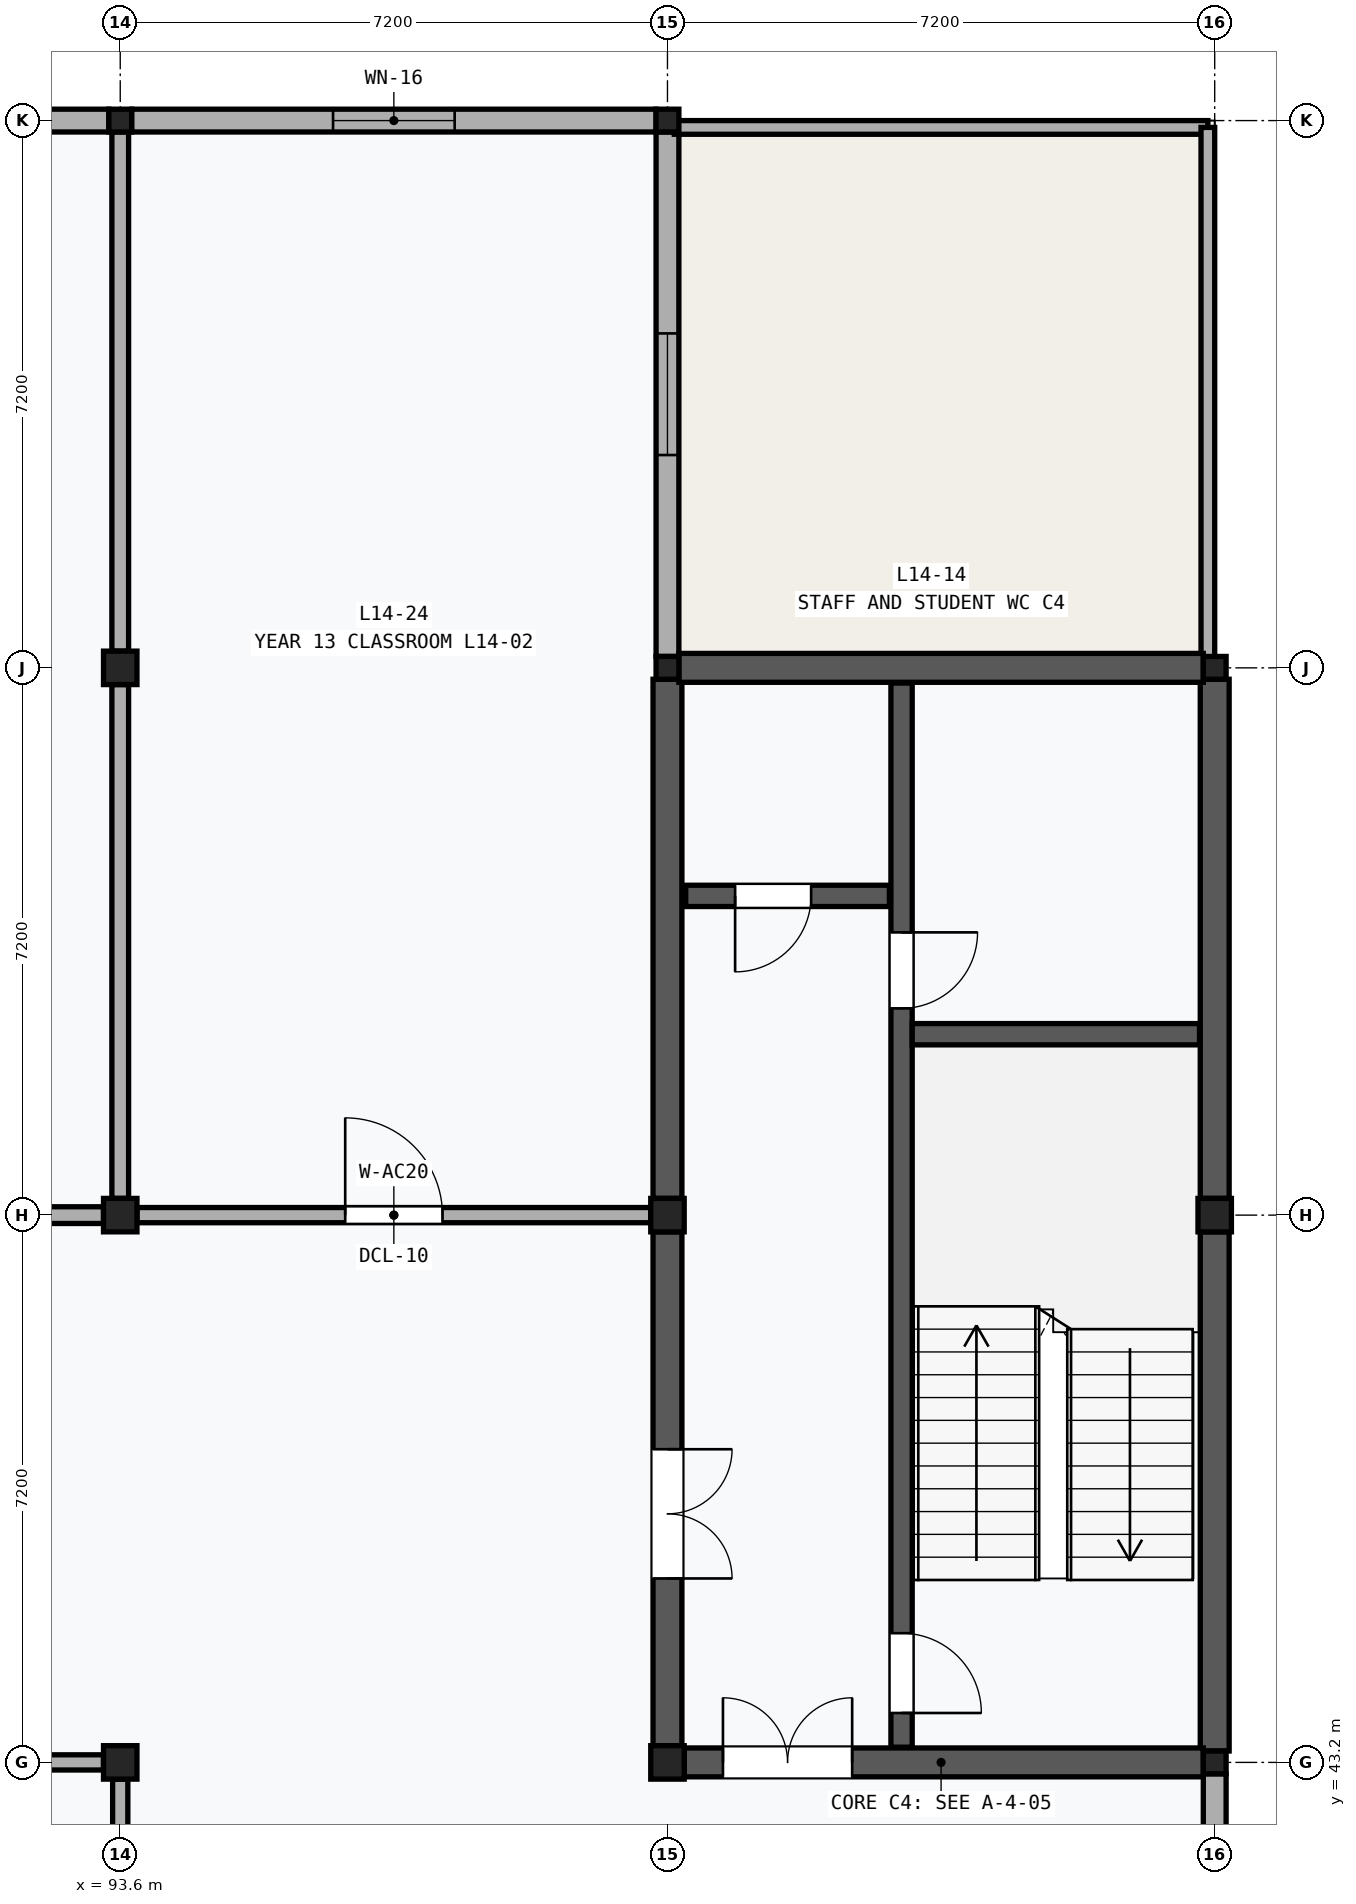
"""IFC4 building model, lengths in metres.
Left out: names, types, materials, properties, quantities, classifications, styles, units other than length and angle.
Written with IfcOpenShell. Run it as: python <this file> out.ifc"""

import sys

from ifc_helpers import new_model, si_unit, direction, frame, frame_2d, origin, origin_2d, place, context, subcontext, project, spatial, rectangle, extrude, element, fill, save


model = new_model("IFC4")
c1 = context("Model", 3, precision=1e-05, world=origin(), true_north=direction((0.0, 1.0)))
c2 = subcontext(c1, "Body", "Model", "MODEL_VIEW")
j1 = project(units=[si_unit("LENGTHUNIT", "METRE"), si_unit("PLANEANGLEUNIT", "RADIAN")], contexts=[c1])
p1 = place(None, origin())
s1 = spatial("IfcSite", under=j1, at=p1, CompositionType="ELEMENT")
p2 = place(p1, origin())
s2 = spatial("IfcBuilding", under=s1, at=p2, CompositionType="ELEMENT")
p3 = place(p2, frame((0.0, 0.0, 59.0)))
s3 = spatial("IfcBuildingStorey", under=s2, at=p3, CompositionType="ELEMENT", Elevation=59.0)
for number, where, z_axis, x_axis in (
    (1, (93.6, 43.2, 0.0), (0.0, 0.0, 1.0), (1.0, 0.0, 0.0)),
    (2, (93.6, 50.4, 0.0), (0.0, 0.0, 1.0), (1.0, 0.0, 0.0)),
    (3, (93.6, 57.6, 0.0), (0.0, 0.0, 1.0), (1.0, 0.0, 0.0)),
):
    element("IfcColumn", number, at=place(p3, frame(where, z_axis=z_axis, x_axis=x_axis)), inside=s3, PredefinedType="COLUMN", context=c2, shape_type="SweptSolid", body=[
        extrude(rectangle(XDim=0.44, YDim=0.44, at=origin_2d()), origin(), (0.0, 0.0, 1.0), 4.0),
    ])
p4 = place(p3, frame((93.6, 64.8, 0.0), z_axis=(0.0, 0.0, 1.0), x_axis=(1.0, 0.0, 0.0)))
e4 = element("IfcColumn", 4, at=p4, inside=s3, PredefinedType="COLUMN", context=c2, shape_type="SweptSolid", body=[
    extrude(rectangle(XDim=0.3, YDim=0.3, at=origin_2d()), origin(), (0.0, 0.0, 1.0), 4.0),
])
for number, where, z_axis, x_axis in (
    (5, (100.8, 43.2, 0.0), (0.0, 0.0, 1.0), (1.0, 0.0, 0.0)),
    (6, (100.8, 50.4, 0.0), (0.0, 0.0, 1.0), (1.0, 0.0, 0.0)),
):
    element("IfcColumn", number, at=place(p3, frame(where, z_axis=z_axis, x_axis=x_axis)), inside=s3, PredefinedType="COLUMN", context=c2, shape_type="SweptSolid", body=[
        extrude(rectangle(XDim=0.44, YDim=0.44, at=origin_2d()), origin(), (0.0, 0.0, 1.0), 4.0),
    ])
for number, where, z_axis, x_axis in (
    (7, (100.8, 57.6, 0.0), (0.0, 0.0, 1.0), (1.0, 0.0, 0.0)),
    (8, (100.8, 64.8, 0.0), (0.0, 0.0, 1.0), (1.0, 0.0, 0.0)),
    (9, (108.0, 43.2, 0.0), (0.0, 0.0, 1.0), (1.0, 0.0, 0.0)),
):
    element("IfcColumn", number, at=place(p3, frame(where, z_axis=z_axis, x_axis=x_axis)), inside=s3, PredefinedType="COLUMN", context=c2, shape_type="SweptSolid", body=[
        extrude(rectangle(XDim=0.3, YDim=0.3, at=origin_2d()), origin(), (0.0, 0.0, 1.0), 4.0),
    ])
p5 = place(p3, frame((108.0, 50.4, 0.0), z_axis=(0.0, 0.0, 1.0), x_axis=(1.0, 0.0, 0.0)))
e10 = element("IfcColumn", 10, at=p5, inside=s3, PredefinedType="COLUMN", context=c2, shape_type="SweptSolid", body=[
    extrude(rectangle(XDim=0.44, YDim=0.44, at=origin_2d()), origin(), (0.0, 0.0, 1.0), 4.0),
])
p6 = place(p3, frame((108.0, 57.6, 0.0), z_axis=(0.0, 0.0, 1.0), x_axis=(1.0, 0.0, 0.0)))
e11 = element("IfcColumn", 11, at=p6, inside=s3, PredefinedType="COLUMN", context=c2, shape_type="SweptSolid", body=[
    extrude(rectangle(XDim=0.3, YDim=0.3, at=origin_2d()), origin(), (0.0, 0.0, 1.0), 4.0),
])
p7 = place(p3, frame((86.55, 64.8, 0.0), z_axis=(0.0, 0.0, 1.0), x_axis=(1.0, 0.0, 0.0)))
e12 = element("IfcWall", 12, at=p7, inside=s3, PredefinedType="SOLIDWALL", context=c2, shape_type="SweptSolid", body=[
    extrude(rectangle(XDim=6.9, YDim=0.3, at=frame_2d((3.45, 0.0))), origin(), (0.0, 0.0, 1.0), 3.19),
])
p8 = place(p7, frame((1.8, 0.0, 0.85)))
e13 = element("IfcOpeningElement", 13, at=p8, cuts=e12, PredefinedType="OPENING", context=c2, shape_type="SweptSolid", body=[
    extrude(rectangle(XDim=3.3, YDim=2.0, at=frame_2d((1.65, 1.0))), frame((0.0, 0.162, 0.0), z_axis=(0.0, -1.0, 0.0), x_axis=(1.0, 0.0, 0.0)), (0.0, 0.0, 1.0), 0.324),
])
p9 = place(p3, frame((93.75, 64.8, 0.0), z_axis=(0.0, 0.0, 1.0), x_axis=(1.0, 0.0, 0.0)))
e14 = element("IfcWall", 14, at=p9, inside=s3, PredefinedType="SOLIDWALL", context=c2, shape_type="SweptSolid", body=[
    extrude(rectangle(XDim=6.9, YDim=0.3, at=frame_2d((3.45, 0.0))), origin(), (0.0, 0.0, 1.0), 3.19),
])
p10 = place(p9, frame((2.65, 0.0, 1.1)))
e15 = element("IfcOpeningElement", 15, at=p10, cuts=e14, PredefinedType="OPENING", context=c2, shape_type="SweptSolid", body=[
    extrude(rectangle(XDim=1.6, YDim=1.5, at=frame_2d((0.8, 0.75))), frame((0.0, 0.162, 0.0), z_axis=(0.0, -1.0, 0.0), x_axis=(1.0, 0.0, 0.0)), (0.0, 0.0, 1.0), 0.324),
])
p11 = place(p3, frame((100.8, 57.75, 0.0), z_axis=(0.0, 0.0, 1.0), x_axis=(0.0, 1.0, 0.0)))
e16 = element("IfcWall", 16, at=p11, inside=s3, PredefinedType="SOLIDWALL", context=c2, shape_type="SweptSolid", body=[
    extrude(rectangle(XDim=6.9, YDim=0.3, at=frame_2d((3.45, 0.0))), origin(), (0.0, 0.0, 1.0), 3.19),
])
p12 = place(p11, frame((2.65, 0.0, 1.1)))
e17 = element("IfcOpeningElement", 17, at=p12, cuts=e16, PredefinedType="OPENING", context=c2, shape_type="SweptSolid", body=[
    extrude(rectangle(XDim=1.6, YDim=1.5, at=frame_2d((0.8, 0.75))), frame((0.0, 0.162, 0.0), z_axis=(0.0, -1.0, 0.0), x_axis=(1.0, 0.0, 0.0)), (0.0, 0.0, 1.0), 0.324),
])
p13 = place(p3, frame((108.0, 36.26, 0.0), z_axis=(0.0, 0.0, 1.0), x_axis=(0.0, 1.0, 0.0)))
e18 = element("IfcWall", 18, at=p13, inside=s3, PredefinedType="SOLIDWALL", context=c2, shape_type="SweptSolid", body=[
    extrude(rectangle(XDim=6.79, YDim=0.3, at=frame_2d((3.395, 0.0))), origin(), (0.0, 0.0, 1.0), 3.19),
])
for number, where, z_axis, x_axis in (
    (19, (100.89, 64.71, 0.0), (0.0, 0.0, 1.0), (1.0, 0.0, 0.0)),
    (20, (107.91, 57.69, 0.0), (0.0, 0.0, 1.0), (0.0, 1.0, 0.0)),
):
    element("IfcWall", number, at=place(p3, frame(where, z_axis=z_axis, x_axis=x_axis)), inside=s3, PredefinedType="PARAPET", context=c2, shape_type="SweptSolid", body=[
        extrude(rectangle(XDim=7.02, YDim=0.18, at=frame_2d((3.51, 0.0))), origin(), (0.0, 0.0, 1.0), 0.95),
    ])
p14 = place(p3, frame((100.8, 43.42, 0.0), z_axis=(0.0, 0.0, 1.0), x_axis=(0.0, 1.0, 0.0)))
e21 = element("IfcWall", 21, at=p14, inside=s3, PredefinedType="SHEAR", context=c2, shape_type="SweptSolid", body=[
    extrude(rectangle(XDim=6.76, YDim=0.38, at=frame_2d((3.38, 0.0))), origin(), (0.0, 0.0, 1.0), 3.11),
])
p15 = place(p14, frame((2.2, 0.0, 0.0)))
e22 = element("IfcOpeningElement", 22, at=p15, cuts=e21, PredefinedType="OPENING", context=c2, shape_type="SweptSolid", body=[
    extrude(rectangle(XDim=1.7, YDim=2.25, at=frame_2d((0.85, 1.125))), frame((0.0, 0.202, 0.0), z_axis=(0.0, -1.0, 0.0), x_axis=(1.0, 0.0, 0.0)), (0.0, 0.0, 1.0), 0.404),
])
p16 = place(p3, frame((100.8, 50.62, 0.0), z_axis=(0.0, 0.0, 1.0), x_axis=(0.0, 1.0, 0.0)))
e23 = element("IfcWall", 23, at=p16, inside=s3, PredefinedType="SHEAR", context=c2, shape_type="SweptSolid", body=[
    extrude(rectangle(XDim=6.83, YDim=0.38, at=frame_2d((3.415, 0.0))), origin(), (0.0, 0.0, 1.0), 3.11),
])
for number, where, z_axis, x_axis in (
    (24, (108.0, 43.35, 0.0), (0.0, 0.0, 1.0), (0.0, 1.0, 0.0)),
    (25, (108.0, 50.62, 0.0), (0.0, 0.0, 1.0), (0.0, 1.0, 0.0)),
):
    element("IfcWall", number, at=place(p3, frame(where, z_axis=z_axis, x_axis=x_axis)), inside=s3, PredefinedType="SHEAR", context=c2, shape_type="SweptSolid", body=[
        extrude(rectangle(XDim=6.83, YDim=0.38, at=frame_2d((3.415, 0.0))), origin(), (0.0, 0.0, 1.0), 3.19),
    ])
p17 = place(p3, frame((101.02, 43.2, 0.0), z_axis=(0.0, 0.0, 1.0), x_axis=(1.0, 0.0, 0.0)))
e26 = element("IfcWall", 26, at=p17, inside=s3, PredefinedType="SHEAR", context=c2, shape_type="SweptSolid", body=[
    extrude(rectangle(XDim=6.83, YDim=0.38, at=frame_2d((3.415, 0.0))), origin(), (0.0, 0.0, 1.0), 3.11),
])
p18 = place(p17, frame((0.51, 0.0, 0.0)))
e27 = element("IfcOpeningElement", 27, at=p18, cuts=e26, PredefinedType="OPENING", context=c2, shape_type="SweptSolid", body=[
    extrude(rectangle(XDim=1.7, YDim=2.25, at=frame_2d((0.85, 1.125))), frame((0.0, 0.202, 0.0), z_axis=(0.0, -1.0, 0.0), x_axis=(1.0, 0.0, 0.0)), (0.0, 0.0, 1.0), 0.404),
])
p19 = place(p3, frame((100.95, 57.6, 0.0), z_axis=(0.0, 0.0, 1.0), x_axis=(1.0, 0.0, 0.0)))
e28 = element("IfcWall", 28, at=p19, inside=s3, PredefinedType="SHEAR", context=c2, shape_type="SweptSolid", body=[
    extrude(rectangle(XDim=6.9, YDim=0.38, at=frame_2d((3.45, 0.0))), origin(), (0.0, 0.0, 1.0), 3.19),
])
p20 = place(p3, frame((103.88, 43.4, 0.0), z_axis=(0.0, 0.0, 1.0), x_axis=(0.0, 1.0, 0.0)))
e29 = element("IfcWall", 29, at=p20, inside=s3, PredefinedType="SHEAR", context=c2, shape_type="SweptSolid", body=[
    extrude(rectangle(XDim=14.0, YDim=0.28, at=frame_2d((7.0, 0.0))), origin(), (0.0, 0.0, 1.0), 3.76),
])
p21 = place(p20, frame((0.45, 0.0, 0.0)))
e30 = element("IfcOpeningElement", 30, at=p21, cuts=e29, PredefinedType="OPENING", context=c2, shape_type="SweptSolid", body=[
    extrude(rectangle(XDim=1.05, YDim=2.15, at=frame_2d((0.525, 1.075))), frame((0.0, 0.152, 0.0), z_axis=(0.0, -1.0, 0.0), x_axis=(1.0, 0.0, 0.0)), (0.0, 0.0, 1.0), 0.304),
])
p22 = place(p20, frame((9.72, 0.0, 0.0)))
e31 = element("IfcOpeningElement", 31, at=p22, cuts=e29, PredefinedType="OPENING", context=c2, shape_type="SweptSolid", body=[
    extrude(rectangle(XDim=1.0, YDim=2.15, at=frame_2d((0.5, 1.075))), frame((0.0, 0.152, 0.0), z_axis=(0.0, -1.0, 0.0), x_axis=(1.0, 0.0, 0.0)), (0.0, 0.0, 1.0), 0.304),
])
p23 = place(p3, frame((104.02, 52.78, 0.0), z_axis=(0.0, 0.0, 1.0), x_axis=(1.0, 0.0, 0.0)))
e32 = element("IfcWall", 32, at=p23, inside=s3, PredefinedType="SHEAR", context=c2, shape_type="SweptSolid", body=[
    extrude(rectangle(XDim=3.78, YDim=0.28, at=frame_2d((1.89, 0.0))), origin(), (0.0, 0.0, 1.0), 3.76),
])
p24 = place(p3, frame((101.04, 54.6, 0.0), z_axis=(0.0, 0.0, 1.0), x_axis=(1.0, 0.0, 0.0)))
e33 = element("IfcWall", 33, at=p24, inside=s3, PredefinedType="SHEAR", context=c2, shape_type="SweptSolid", body=[
    extrude(rectangle(XDim=2.68, YDim=0.28, at=frame_2d((1.34, 0.0))), origin(), (0.0, 0.0, 1.0), 3.76),
])
p25 = place(p24, frame((0.65, 0.0, 0.0)))
e34 = element("IfcOpeningElement", 34, at=p25, cuts=e33, PredefinedType="OPENING", context=c2, shape_type="SweptSolid", body=[
    extrude(rectangle(XDim=1.0, YDim=2.15, at=frame_2d((0.5, 1.075))), frame((0.0, 0.152, 0.0), z_axis=(0.0, -1.0, 0.0), x_axis=(1.0, 0.0, 0.0)), (0.0, 0.0, 1.0), 0.304),
])
p26 = place(p3, frame((86.62, 50.4, 0.0), z_axis=(0.0, 0.0, 1.0), x_axis=(1.0, 0.0, 0.0)))
e35 = element("IfcWall", 35, at=p26, inside=s3, PredefinedType="PARTITIONING", context=c2, shape_type="SweptSolid", body=[
    extrude(rectangle(XDim=6.76, YDim=0.22, at=frame_2d((3.38, 0.0))), origin(), (0.0, 0.0, 1.0), 3.11),
])
p27 = place(p26, frame((2.78, 0.0, 0.0)))
e36 = element("IfcOpeningElement", 36, at=p27, cuts=e35, PredefinedType="OPENING", context=c2, shape_type="SweptSolid", body=[
    extrude(rectangle(XDim=1.2, YDim=2.24, at=frame_2d((0.6, 1.12))), frame((0.0, 0.122, 0.0), z_axis=(0.0, -1.0, 0.0), x_axis=(1.0, 0.0, 0.0)), (0.0, 0.0, 1.0), 0.244),
])
p28 = place(p3, frame((93.6, 50.62, 0.0), z_axis=(0.0, 0.0, 1.0), x_axis=(0.0, 1.0, 0.0)))
e37 = element("IfcWall", 37, at=p28, inside=s3, PredefinedType="PARTITIONING", context=c2, shape_type="SweptSolid", body=[
    extrude(rectangle(XDim=6.76, YDim=0.22, at=frame_2d((3.38, 0.0))), origin(), (0.0, 0.0, 1.0), 3.11),
])
p29 = place(p3, frame((93.6, 57.82, 0.0), z_axis=(0.0, 0.0, 1.0), x_axis=(0.0, 1.0, 0.0)))
e38 = element("IfcWall", 38, at=p29, inside=s3, PredefinedType="PARTITIONING", context=c2, shape_type="SweptSolid", body=[
    extrude(rectangle(XDim=6.83, YDim=0.22, at=frame_2d((3.415, 0.0))), origin(), (0.0, 0.0, 1.0), 3.11),
])
p30 = place(p3, frame((93.82, 50.4, 0.0), z_axis=(0.0, 0.0, 1.0), x_axis=(1.0, 0.0, 0.0)))
e39 = element("IfcWall", 39, at=p30, inside=s3, PredefinedType="PARTITIONING", context=c2, shape_type="SweptSolid", body=[
    extrude(rectangle(XDim=6.76, YDim=0.2, at=frame_2d((3.38, 0.0))), origin(), (0.0, 0.0, 1.0), 3.11),
])
p31 = place(p30, frame((2.74, 0.0, 0.0)))
e40 = element("IfcOpeningElement", 40, at=p31, cuts=e39, PredefinedType="OPENING", context=c2, shape_type="SweptSolid", body=[
    extrude(rectangle(XDim=1.28, YDim=2.28, at=frame_2d((0.64, 1.14))), frame((0.0, 0.112, 0.0), z_axis=(0.0, -1.0, 0.0), x_axis=(1.0, 0.0, 0.0)), (0.0, 0.0, 1.0), 0.224),
])
p32 = place(p3, frame((86.62, 43.2, 0.0), z_axis=(0.0, 0.0, 1.0), x_axis=(1.0, 0.0, 0.0)))
e41 = element("IfcWall", 41, at=p32, inside=s3, PredefinedType="PARTITIONING", context=c2, shape_type="SweptSolid", body=[
    extrude(rectangle(XDim=6.76, YDim=0.2, at=frame_2d((3.38, 0.0))), origin(), (0.0, 0.0, 1.0), 3.11),
])
p33 = place(p3, frame((93.6, 36.22, 0.0), z_axis=(0.0, 0.0, 1.0), x_axis=(0.0, 1.0, 0.0)))
e42 = element("IfcWall", 42, at=p33, inside=s3, PredefinedType="PARTITIONING", context=c2, shape_type="SweptSolid", body=[
    extrude(rectangle(XDim=6.76, YDim=0.2, at=frame_2d((3.38, 0.0))), origin(), (0.0, 0.0, 1.0), 3.11),
])
p34 = place(p10, origin())
e43 = element("IfcWindow", 43, at=p34, inside=s3, PartitioningType="SINGLE_PANEL", PredefinedType="WINDOW", context=c2, shape_type="SweptSolid", body=[
    extrude(rectangle(XDim=1.6, YDim=1.5, at=frame_2d((0.8, 0.75))), frame((0.0, 0.03, 0.0), z_axis=(0.0, -1.0, 0.0), x_axis=(1.0, 0.0, 0.0)), (0.0, 0.0, 1.0), 0.06),
])
fill(e15, e43)
p35 = place(p12, origin())
e44 = element("IfcWindow", 44, at=p35, inside=s3, PartitioningType="SINGLE_PANEL", PredefinedType="WINDOW", context=c2, shape_type="SweptSolid", body=[
    extrude(rectangle(XDim=1.6, YDim=1.5, at=frame_2d((0.8, 0.75))), frame((0.0, 0.03, 0.0), z_axis=(0.0, -1.0, 0.0), x_axis=(1.0, 0.0, 0.0)), (0.0, 0.0, 1.0), 0.06),
])
fill(e17, e44)
p36 = place(p15, frame((1.7, 0.0, 0.0), z_axis=(0.0, 0.0, 1.0), x_axis=(-1.0, 0.0, 0.0)))
e45 = element("IfcDoor", 45, at=p36, inside=s3, OperationType="DOUBLE_DOOR_SINGLE_SWING", PredefinedType="DOOR", context=c2, shape_type="SweptSolid", body=[
    extrude(rectangle(XDim=1.7, YDim=2.25, at=frame_2d((0.85, 1.125))), frame((0.0, 0.025, 0.0), z_axis=(0.0, -1.0, 0.0), x_axis=(1.0, 0.0, 0.0)), (0.0, 0.0, 1.0), 0.05),
])
fill(e22, e45)
p37 = place(p18, origin())
e46 = element("IfcDoor", 46, at=p37, inside=s3, OperationType="DOUBLE_DOOR_SINGLE_SWING", PredefinedType="DOOR", context=c2, shape_type="SweptSolid", body=[
    extrude(rectangle(XDim=1.7, YDim=2.25, at=frame_2d((0.85, 1.125))), frame((0.0, 0.025, 0.0), z_axis=(0.0, -1.0, 0.0), x_axis=(1.0, 0.0, 0.0)), (0.0, 0.0, 1.0), 0.05),
])
fill(e27, e46)
p38 = place(p21, frame((1.05, 0.0, 0.0), z_axis=(0.0, 0.0, 1.0), x_axis=(-1.0, 0.0, 0.0)))
e47 = element("IfcDoor", 47, at=p38, inside=s3, OperationType="SINGLE_SWING_RIGHT", PredefinedType="DOOR", context=c2, shape_type="SweptSolid", body=[
    extrude(rectangle(XDim=1.05, YDim=2.15, at=frame_2d((0.525, 1.075))), frame((0.0, 0.025, 0.0), z_axis=(0.0, -1.0, 0.0), x_axis=(1.0, 0.0, 0.0)), (0.0, 0.0, 1.0), 0.05),
])
fill(e30, e47)
p39 = place(p22, frame((1.0, 0.0, 0.0), z_axis=(0.0, 0.0, 1.0), x_axis=(-1.0, 0.0, 0.0)))
e48 = element("IfcDoor", 48, at=p39, inside=s3, OperationType="SINGLE_SWING_LEFT", PredefinedType="DOOR", context=c2, shape_type="SweptSolid", body=[
    extrude(rectangle(XDim=1.0, YDim=2.15, at=frame_2d((0.5, 1.075))), frame((0.0, 0.025, 0.0), z_axis=(0.0, -1.0, 0.0), x_axis=(1.0, 0.0, 0.0)), (0.0, 0.0, 1.0), 0.05),
])
fill(e31, e48)
p40 = place(p25, frame((1.0, 0.0, 0.0), z_axis=(0.0, 0.0, 1.0), x_axis=(-1.0, 0.0, 0.0)))
e49 = element("IfcDoor", 49, at=p40, inside=s3, OperationType="SINGLE_SWING_RIGHT", PredefinedType="DOOR", context=c2, shape_type="SweptSolid", body=[
    extrude(rectangle(XDim=1.0, YDim=2.15, at=frame_2d((0.5, 1.075))), frame((0.0, 0.025, 0.0), z_axis=(0.0, -1.0, 0.0), x_axis=(1.0, 0.0, 0.0)), (0.0, 0.0, 1.0), 0.05),
])
fill(e34, e49)
p41 = place(p31, origin())
e50 = element("IfcDoor", 50, at=p41, inside=s3, OperationType="SINGLE_SWING_LEFT", PredefinedType="DOOR", context=c2, shape_type="SweptSolid", body=[
    extrude(rectangle(XDim=1.28, YDim=2.28, at=frame_2d((0.64, 1.14))), frame((0.0, 0.025, 0.0), z_axis=(0.0, -1.0, 0.0), x_axis=(1.0, 0.0, 0.0)), (0.0, 0.0, 1.0), 0.05),
])
fill(e40, e50)
save(model, sys.argv[1])
